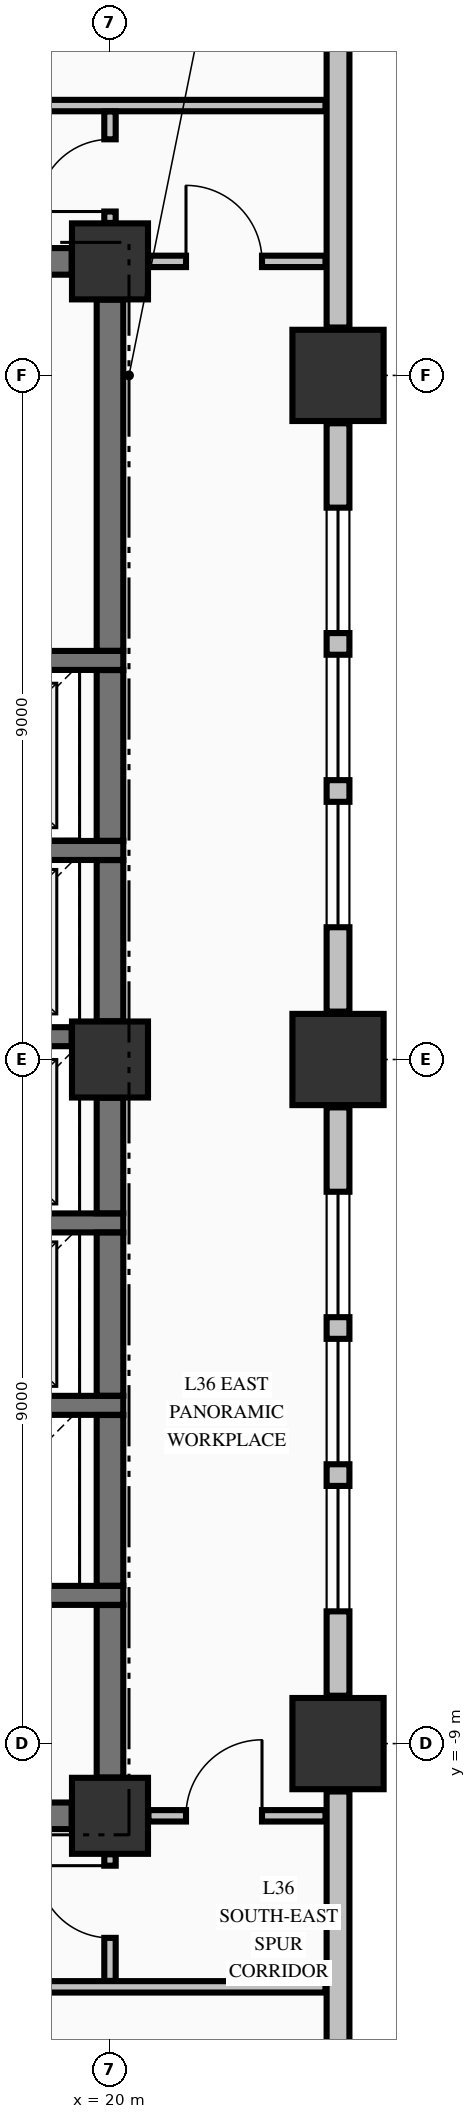
"""IFC4 building model, lengths in metres.
Left out: names, types, materials, properties, quantities, classifications, styles, units other than length and angle.
Written with IfcOpenShell. Run it as: python <this file> out.ifc"""

import sys

from ifc_helpers import new_model, si_unit, direction, frame, frame_2d, origin, origin_2d, place, context, subcontext, project, spatial, rectangle, extrude, element, fill, save


model = new_model("IFC4")
c1 = context("Model", 3, precision=1e-05, world=origin(), true_north=direction((0.0, 1.0)))
c2 = subcontext(c1, "Body", "Model", "MODEL_VIEW")
j1 = project(units=[si_unit("LENGTHUNIT", "METRE"), si_unit("PLANEANGLEUNIT", "RADIAN")], contexts=[c1])
p1 = place(None, origin())
s1 = spatial("IfcSite", under=j1, at=p1, CompositionType="ELEMENT")
p2 = place(p1, origin())
s2 = spatial("IfcBuilding", under=s1, at=p2, CompositionType="ELEMENT")
p3 = place(p2, frame((0.0, 0.0, 142.77)))
s3 = spatial("IfcBuildingStorey", under=s2, at=p3, CompositionType="ELEMENT", Elevation=142.77)
for number, where, z_axis, x_axis in (
    (1, (23.0, -9.0, -0.325), (0.0, 0.0, 1.0), (1.0, 0.0, 0.0)),
    (2, (23.0, 0.0, -0.325), (0.0, 0.0, 1.0), (1.0, 0.0, 0.0)),
    (3, (23.0, 9.0, -0.325), (0.0, 0.0, 1.0), (1.0, 0.0, 0.0)),
):
    element("IfcColumn", number, at=place(p3, frame(where, z_axis=z_axis, x_axis=x_axis)), inside=s3, PredefinedType="COLUMN", context=c2, shape_type="SweptSolid", body=[
        extrude(rectangle(XDim=1.2, YDim=1.2, at=origin_2d()), origin(), (0.0, 0.0, 1.0), 3.645),
    ])
for number, where, z_axis, x_axis in (
    (4, (20.0, -9.95, -0.325), (0.0, 0.0, 1.0), (1.0, 0.0, 0.0)),
    (5, (20.0, 10.5, -0.325), (0.0, 0.0, 1.0), (1.0, 0.0, 0.0)),
    (6, (20.0, 0.0, -0.325), (0.0, 0.0, 1.0), (1.0, 0.0, 0.0)),
):
    element("IfcColumn", number, at=place(p3, frame(where, z_axis=z_axis, x_axis=x_axis)), inside=s3, PredefinedType="COLUMN", context=c2, shape_type="SweptSolid", body=[
        extrude(rectangle(XDim=1.0, YDim=1.0, at=origin_2d()), origin(), (0.0, 0.0, 1.0), 3.645),
    ])
p4 = place(p3, frame((23.0, -20.37, 0.0), z_axis=(0.0, 0.0, 1.0), x_axis=(0.0, 1.0, 0.0)))
e7 = element("IfcWall", 7, at=p4, inside=s3, PredefinedType="STANDARD", context=c2, shape_type="SweptSolid", body=[
    extrude(rectangle(XDim=10.74, YDim=0.3, at=frame_2d((5.37, 0.0))), origin(), (0.0, 0.0, 1.0), 2.712),
])
p5 = place(p3, frame((23.0, -8.37, 0.0), z_axis=(0.0, 0.0, 1.0), x_axis=(0.0, 1.0, 0.0)))
e8 = element("IfcWall", 8, at=p5, inside=s3, PredefinedType="STANDARD", context=c2, shape_type="SweptSolid", body=[
    extrude(rectangle(XDim=7.74, YDim=0.3, at=frame_2d((3.87, 0.0))), origin(), (0.0, 0.0, 1.0), 2.712),
])
p6 = place(p5, frame((1.11, 0.0, 0.8)))
e9 = element("IfcOpeningElement", 9, at=p6, cuts=e8, PredefinedType="OPENING", context=c2, shape_type="SweptSolid", body=[
    extrude(rectangle(XDim=1.65, YDim=1.7, at=frame_2d((0.825, 0.85))), frame((0.0, 0.16, 0.0), z_axis=(0.0, -1.0, 0.0), x_axis=(1.0, 0.0, 0.0)), (0.0, 0.0, 1.0), 0.32),
])
p7 = place(p5, frame((3.045, 0.0, 0.8)))
e10 = element("IfcOpeningElement", 10, at=p7, cuts=e8, PredefinedType="OPENING", context=c2, shape_type="SweptSolid", body=[
    extrude(rectangle(XDim=1.65, YDim=1.7, at=frame_2d((0.825, 0.85))), frame((0.0, 0.16, 0.0), z_axis=(0.0, -1.0, 0.0), x_axis=(1.0, 0.0, 0.0)), (0.0, 0.0, 1.0), 0.32),
])
p8 = place(p5, frame((4.98, 0.0, 0.8)))
e11 = element("IfcOpeningElement", 11, at=p8, cuts=e8, PredefinedType="OPENING", context=c2, shape_type="SweptSolid", body=[
    extrude(rectangle(XDim=1.65, YDim=1.7, at=frame_2d((0.825, 0.85))), frame((0.0, 0.16, 0.0), z_axis=(0.0, -1.0, 0.0), x_axis=(1.0, 0.0, 0.0)), (0.0, 0.0, 1.0), 0.32),
])
p9 = place(p3, frame((23.0, 0.63, 0.0), z_axis=(0.0, 0.0, 1.0), x_axis=(0.0, 1.0, 0.0)))
e12 = element("IfcWall", 12, at=p9, inside=s3, PredefinedType="STANDARD", context=c2, shape_type="SweptSolid", body=[
    extrude(rectangle(XDim=7.74, YDim=0.3, at=frame_2d((3.87, 0.0))), origin(), (0.0, 0.0, 1.0), 2.712),
])
p10 = place(p9, frame((1.11, 0.0, 0.8)))
e13 = element("IfcOpeningElement", 13, at=p10, cuts=e12, PredefinedType="OPENING", context=c2, shape_type="SweptSolid", body=[
    extrude(rectangle(XDim=1.65, YDim=1.7, at=frame_2d((0.825, 0.85))), frame((0.0, 0.16, 0.0), z_axis=(0.0, -1.0, 0.0), x_axis=(1.0, 0.0, 0.0)), (0.0, 0.0, 1.0), 0.32),
])
p11 = place(p9, frame((3.045, 0.0, 0.8)))
e14 = element("IfcOpeningElement", 14, at=p11, cuts=e12, PredefinedType="OPENING", context=c2, shape_type="SweptSolid", body=[
    extrude(rectangle(XDim=1.65, YDim=1.7, at=frame_2d((0.825, 0.85))), frame((0.0, 0.16, 0.0), z_axis=(0.0, -1.0, 0.0), x_axis=(1.0, 0.0, 0.0)), (0.0, 0.0, 1.0), 0.32),
])
p12 = place(p9, frame((4.98, 0.0, 0.8)))
e15 = element("IfcOpeningElement", 15, at=p12, cuts=e12, PredefinedType="OPENING", context=c2, shape_type="SweptSolid", body=[
    extrude(rectangle(XDim=1.65, YDim=1.7, at=frame_2d((0.825, 0.85))), frame((0.0, 0.16, 0.0), z_axis=(0.0, -1.0, 0.0), x_axis=(1.0, 0.0, 0.0)), (0.0, 0.0, 1.0), 0.32),
])
p13 = place(p3, frame((23.0, 9.63, 0.0), z_axis=(0.0, 0.0, 1.0), x_axis=(0.0, 1.0, 0.0)))
e16 = element("IfcWall", 16, at=p13, inside=s3, PredefinedType="STANDARD", context=c2, shape_type="SweptSolid", body=[
    extrude(rectangle(XDim=10.74, YDim=0.3, at=frame_2d((5.37, 0.0))), origin(), (0.0, 0.0, 1.0), 2.712),
])
p14 = place(p3, frame((14.7, -9.95, 0.0), z_axis=(0.0, 0.0, 1.0), x_axis=(1.0, 0.0, 0.0)))
e17 = element("IfcWall", 17, at=p14, inside=s3, PredefinedType="SHEAR", context=c2, shape_type="SweptSolid", body=[
    extrude(rectangle(XDim=4.796, YDim=0.35, at=frame_2d((2.398, 0.0))), origin(), (0.0, 0.0, 1.0), 3.32),
])
p15 = place(p14, frame((0.65, 0.0, 0.0)))
e18 = element("IfcOpeningElement", 18, at=p15, cuts=e17, PredefinedType="OPENING", context=c2, shape_type="SweptSolid", body=[
    extrude(rectangle(XDim=1.2, YDim=2.15, at=frame_2d((0.6, 1.075))), frame((0.0, 0.185, 0.0), z_axis=(0.0, -1.0, 0.0), x_axis=(1.0, 0.0, 0.0)), (0.0, 0.0, 1.0), 0.37),
])
for number, where, z_axis, x_axis in (
    (19, (17.025, -7.05, 0.0), (0.0, 0.0, 1.0), (1.0, 0.0, 0.0)),
    (20, (17.025, -4.55, 0.0), (0.0, 0.0, 1.0), (1.0, 0.0, 0.0)),
    (21, (17.025, -2.15, 0.0), (0.0, 0.0, 1.0), (1.0, 0.0, 0.0)),
):
    element("IfcWall", number, at=place(p3, frame(where, z_axis=z_axis, x_axis=x_axis)), inside=s3, PredefinedType="SOLIDWALL", context=c2, shape_type="SweptSolid", body=[
        extrude(rectangle(XDim=3.15, YDim=0.25, at=frame_2d((1.575, 0.0))), origin(), (0.0, 0.0, 1.0), 3.32),
    ])
p16 = place(p3, frame((17.025, 0.3, 0.0), z_axis=(0.0, 0.0, 1.0), x_axis=(1.0, 0.0, 0.0)))
e22 = element("IfcWall", 22, at=p16, inside=s3, PredefinedType="SOLIDWALL", context=c2, shape_type="SweptSolid", body=[
    extrude(rectangle(XDim=2.471, YDim=0.25, at=frame_2d((1.236, 0.0))), origin(), (0.0, 0.0, 1.0), 3.32),
])
for number, where, z_axis, x_axis in (
    (23, (17.025, 2.75, 0.0), (0.0, 0.0, 1.0), (1.0, 0.0, 0.0)),
    (24, (17.025, 5.25, 0.0), (0.0, 0.0, 1.0), (1.0, 0.0, 0.0)),
):
    element("IfcWall", number, at=place(p3, frame(where, z_axis=z_axis, x_axis=x_axis)), inside=s3, PredefinedType="SOLIDWALL", context=c2, shape_type="SweptSolid", body=[
        extrude(rectangle(XDim=3.15, YDim=0.25, at=frame_2d((1.575, 0.0))), origin(), (0.0, 0.0, 1.0), 3.32),
    ])
p17 = place(p3, frame((14.7, 10.5, 0.0), z_axis=(0.0, 0.0, 1.0), x_axis=(1.0, 0.0, 0.0)))
e25 = element("IfcWall", 25, at=p17, inside=s3, PredefinedType="SHEAR", context=c2, shape_type="SweptSolid", body=[
    extrude(rectangle(XDim=4.796, YDim=0.35, at=frame_2d((2.398, 0.0))), origin(), (0.0, 0.0, 1.0), 3.32),
])
p18 = place(p17, frame((0.65, 0.0, 0.0)))
e26 = element("IfcOpeningElement", 26, at=p18, cuts=e25, PredefinedType="OPENING", context=c2, shape_type="SweptSolid", body=[
    extrude(rectangle(XDim=1.2, YDim=2.15, at=frame_2d((0.6, 1.075))), frame((0.0, 0.185, 0.0), z_axis=(0.0, -1.0, 0.0), x_axis=(1.0, 0.0, 0.0)), (0.0, 0.0, 1.0), 0.37),
])
p19 = place(p17, frame((3.25, 0.0, 0.0)))
e27 = element("IfcOpeningElement", 27, at=p19, cuts=e25, PredefinedType="OPENING", context=c2, shape_type="SweptSolid", body=[
    extrude(rectangle(XDim=0.9, YDim=2.15, at=frame_2d((0.45, 1.075))), frame((0.0, 0.185, 0.0), z_axis=(0.0, -1.0, 0.0), x_axis=(1.0, 0.0, 0.0)), (0.0, 0.0, 1.0), 0.37),
])
p20 = place(p3, frame((-27.835, -12.2, 0.0), z_axis=(0.0, 0.0, 1.0), x_axis=(1.0, 0.0, 0.0)))
e28 = element("IfcWall", 28, at=p20, inside=s3, PredefinedType="PARTITIONING", context=c2, shape_type="SweptSolid", body=[
    extrude(rectangle(XDim=50.67, YDim=0.15, at=frame_2d((25.335, 0.0))), origin(), (0.0, 0.0, 1.0), 3.32),
])
p21 = place(p20, frame((13.985, 0.0, 0.0)))
e29 = element("IfcOpeningElement", 29, at=p21, cuts=e28, PredefinedType="OPENING", context=c2, shape_type="SweptSolid", body=[
    extrude(rectangle(XDim=1.1, YDim=2.15, at=frame_2d((0.55, 1.075))), frame((0.0, 0.085, 0.0), z_axis=(0.0, -1.0, 0.0), x_axis=(1.0, 0.0, 0.0)), (0.0, 0.0, 1.0), 0.17),
])
p22 = place(p20, frame((23.885, 0.0, 0.0)))
e30 = element("IfcOpeningElement", 30, at=p22, cuts=e28, PredefinedType="OPENING", context=c2, shape_type="SweptSolid", body=[
    extrude(rectangle(XDim=1.1, YDim=2.15, at=frame_2d((0.55, 1.075))), frame((0.0, 0.085, 0.0), z_axis=(0.0, -1.0, 0.0), x_axis=(1.0, 0.0, 0.0)), (0.0, 0.0, 1.0), 0.17),
])
p23 = place(p20, frame((30.685, 0.0, 0.0)))
e31 = element("IfcOpeningElement", 31, at=p23, cuts=e28, PredefinedType="OPENING", context=c2, shape_type="SweptSolid", body=[
    extrude(rectangle(XDim=1.1, YDim=2.15, at=frame_2d((0.55, 1.075))), frame((0.0, 0.085, 0.0), z_axis=(0.0, -1.0, 0.0), x_axis=(1.0, 0.0, 0.0)), (0.0, 0.0, 1.0), 0.17),
])
p24 = place(p20, frame((39.935, 0.0, 0.0)))
e32 = element("IfcOpeningElement", 32, at=p24, cuts=e28, PredefinedType="OPENING", context=c2, shape_type="SweptSolid", body=[
    extrude(rectangle(XDim=1.1, YDim=2.15, at=frame_2d((0.55, 1.075))), frame((0.0, 0.085, 0.0), z_axis=(0.0, -1.0, 0.0), x_axis=(1.0, 0.0, 0.0)), (0.0, 0.0, 1.0), 0.17),
])
p25 = place(p3, frame((20.506, -9.95, 0.0), z_axis=(0.0, 0.0, 1.0), x_axis=(1.0, 0.0, 0.0)))
e33 = element("IfcWall", 33, at=p25, inside=s3, PredefinedType="PARTITIONING", context=c2, shape_type="SweptSolid", body=[
    extrude(rectangle(XDim=2.329, YDim=0.15, at=frame_2d((1.165, 0.0))), origin(), (0.0, 0.0, 1.0), 3.32),
])
p26 = place(p25, frame((0.494, 0.0, 0.0)))
e34 = element("IfcOpeningElement", 34, at=p26, cuts=e33, PredefinedType="OPENING", context=c2, shape_type="SweptSolid", body=[
    extrude(rectangle(XDim=1.0, YDim=2.15, at=frame_2d((0.5, 1.075))), frame((0.0, 0.085, 0.0), z_axis=(0.0, -1.0, 0.0), x_axis=(1.0, 0.0, 0.0)), (0.0, 0.0, 1.0), 0.17),
])
p27 = place(p3, frame((20.506, 10.5, 0.0), z_axis=(0.0, 0.0, 1.0), x_axis=(1.0, 0.0, 0.0)))
e35 = element("IfcWall", 35, at=p27, inside=s3, PredefinedType="PARTITIONING", context=c2, shape_type="SweptSolid", body=[
    extrude(rectangle(XDim=2.329, YDim=0.15, at=frame_2d((1.165, 0.0))), origin(), (0.0, 0.0, 1.0), 3.32),
])
p28 = place(p27, frame((0.494, 0.0, 0.0)))
e36 = element("IfcOpeningElement", 36, at=p28, cuts=e35, PredefinedType="OPENING", context=c2, shape_type="SweptSolid", body=[
    extrude(rectangle(XDim=1.0, YDim=2.15, at=frame_2d((0.5, 1.075))), frame((0.0, 0.085, 0.0), z_axis=(0.0, -1.0, 0.0), x_axis=(1.0, 0.0, 0.0)), (0.0, 0.0, 1.0), 0.17),
])
p29 = place(p3, frame((-27.835, 12.55, 0.0), z_axis=(0.0, 0.0, 1.0), x_axis=(1.0, 0.0, 0.0)))
e37 = element("IfcWall", 37, at=p29, inside=s3, PredefinedType="PARTITIONING", context=c2, shape_type="SweptSolid", body=[
    extrude(rectangle(XDim=50.67, YDim=0.15, at=frame_2d((25.335, 0.0))), origin(), (0.0, 0.0, 1.0), 3.32),
])
p30 = place(p29, frame((13.81, 0.0, 0.0)))
e38 = element("IfcOpeningElement", 38, at=p30, cuts=e37, PredefinedType="OPENING", context=c2, shape_type="SweptSolid", body=[
    extrude(rectangle(XDim=1.05, YDim=2.15, at=frame_2d((0.525, 1.075))), frame((0.0, 0.085, 0.0), z_axis=(0.0, -1.0, 0.0), x_axis=(1.0, 0.0, 0.0)), (0.0, 0.0, 1.0), 0.17),
])
p31 = place(p29, frame((25.11, 0.0, 0.0)))
e39 = element("IfcOpeningElement", 39, at=p31, cuts=e37, PredefinedType="OPENING", context=c2, shape_type="SweptSolid", body=[
    extrude(rectangle(XDim=1.05, YDim=2.15, at=frame_2d((0.525, 1.075))), frame((0.0, 0.085, 0.0), z_axis=(0.0, -1.0, 0.0), x_axis=(1.0, 0.0, 0.0)), (0.0, 0.0, 1.0), 0.17),
])
p32 = place(p29, frame((44.16, 0.0, 0.0)))
e40 = element("IfcOpeningElement", 40, at=p32, cuts=e37, PredefinedType="OPENING", context=c2, shape_type="SweptSolid", body=[
    extrude(rectangle(XDim=1.05, YDim=2.15, at=frame_2d((0.525, 1.075))), frame((0.0, 0.085, 0.0), z_axis=(0.0, -1.0, 0.0), x_axis=(1.0, 0.0, 0.0)), (0.0, 0.0, 1.0), 0.17),
])
p33 = place(p3, frame((20.0, -9.446, 0.0), z_axis=(0.0, 0.0, 1.0), x_axis=(0.0, 1.0, 0.0)))
e41 = element("IfcWall", 41, at=p33, inside=s3, PredefinedType="SHEAR", context=c2, shape_type="SweptSolid", body=[
    extrude(rectangle(XDim=2.269, YDim=0.35, at=frame_2d((1.135, 0.0))), origin(), (0.0, 0.0, 1.0), 3.32),
])
p34 = place(p3, frame((20.0, -6.923, 0.0), z_axis=(0.0, 0.0, 1.0), x_axis=(0.0, 1.0, 0.0)))
e42 = element("IfcWall", 42, at=p34, inside=s3, PredefinedType="SHEAR", context=c2, shape_type="SweptSolid", body=[
    extrude(rectangle(XDim=2.246, YDim=0.35, at=frame_2d((1.123, 0.0))), origin(), (0.0, 0.0, 1.0), 3.32),
])
p35 = place(p3, frame((20.0, -4.423, 0.0), z_axis=(0.0, 0.0, 1.0), x_axis=(0.0, 1.0, 0.0)))
e43 = element("IfcWall", 43, at=p35, inside=s3, PredefinedType="SHEAR", context=c2, shape_type="SweptSolid", body=[
    extrude(rectangle(XDim=2.146, YDim=0.35, at=frame_2d((1.073, 0.0))), origin(), (0.0, 0.0, 1.0), 3.32),
])
p36 = place(p3, frame((20.0, -2.023, 0.0), z_axis=(0.0, 0.0, 1.0), x_axis=(0.0, 1.0, 0.0)))
e44 = element("IfcWall", 44, at=p36, inside=s3, PredefinedType="SHEAR", context=c2, shape_type="SweptSolid", body=[
    extrude(rectangle(XDim=1.519, YDim=0.35, at=frame_2d((0.76, 0.0))), origin(), (0.0, 0.0, 1.0), 3.32),
])
p37 = place(p3, frame((20.0, 0.504, 0.0), z_axis=(0.0, 0.0, 1.0), x_axis=(0.0, 1.0, 0.0)))
e45 = element("IfcWall", 45, at=p37, inside=s3, PredefinedType="SHEAR", context=c2, shape_type="SweptSolid", body=[
    extrude(rectangle(XDim=2.119, YDim=0.35, at=frame_2d((1.06, 0.0))), origin(), (0.0, 0.0, 1.0), 3.32),
])
p38 = place(p3, frame((20.0, 2.877, 0.0), z_axis=(0.0, 0.0, 1.0), x_axis=(0.0, 1.0, 0.0)))
e46 = element("IfcWall", 46, at=p38, inside=s3, PredefinedType="SHEAR", context=c2, shape_type="SweptSolid", body=[
    extrude(rectangle(XDim=2.246, YDim=0.35, at=frame_2d((1.123, 0.0))), origin(), (0.0, 0.0, 1.0), 3.32),
])
p39 = place(p3, frame((20.0, 5.377, 0.0), z_axis=(0.0, 0.0, 1.0), x_axis=(0.0, 1.0, 0.0)))
e47 = element("IfcWall", 47, at=p39, inside=s3, PredefinedType="SHEAR", context=c2, shape_type="SweptSolid", body=[
    extrude(rectangle(XDim=4.619, YDim=0.35, at=frame_2d((2.31, 0.0))), origin(), (0.0, 0.0, 1.0), 3.32),
])
p40 = place(p3, frame((20.0, -12.122, 0.0), z_axis=(0.0, 0.0, 1.0), x_axis=(0.0, 1.0, 0.0)))
e48 = element("IfcWall", 48, at=p40, inside=s3, PredefinedType="PARTITIONING", context=c2, shape_type="SweptSolid", body=[
    extrude(rectangle(XDim=1.666, YDim=0.15, at=frame_2d((0.833, 0.0))), origin(), (0.0, 0.0, 1.0), 2.81),
])
p41 = place(p40, frame((0.566, 0.0, 0.0)))
e49 = element("IfcOpeningElement", 49, at=p41, cuts=e48, PredefinedType="OPENING", context=c2, shape_type="SweptSolid", body=[
    extrude(rectangle(XDim=0.95, YDim=2.15, at=frame_2d((0.475, 1.075))), frame((0.0, 0.085, 0.0), z_axis=(0.0, -1.0, 0.0), x_axis=(1.0, 0.0, 0.0)), (0.0, 0.0, 1.0), 0.17),
])
p42 = place(p3, frame((20.0, 11.006, 0.0), z_axis=(0.0, 0.0, 1.0), x_axis=(0.0, 1.0, 0.0)))
e50 = element("IfcWall", 50, at=p42, inside=s3, PredefinedType="PARTITIONING", context=c2, shape_type="SweptSolid", body=[
    extrude(rectangle(XDim=1.466, YDim=0.15, at=frame_2d((0.733, 0.0))), origin(), (0.0, 0.0, 1.0), 2.81),
])
p43 = place(p42, frame((0.15, 0.0, 0.0)))
e51 = element("IfcOpeningElement", 51, at=p43, cuts=e50, PredefinedType="OPENING", context=c2, shape_type="SweptSolid", body=[
    extrude(rectangle(XDim=0.95, YDim=2.15, at=frame_2d((0.475, 1.075))), frame((0.0, 0.085, 0.0), z_axis=(0.0, -1.0, 0.0), x_axis=(1.0, 0.0, 0.0)), (0.0, 0.0, 1.0), 0.17),
])
p44 = place(p6, origin())
e52 = element("IfcWindow", 52, at=p44, inside=s3, PartitioningType="SINGLE_PANEL", PredefinedType="WINDOW", context=c2, shape_type="SweptSolid", body=[
    extrude(rectangle(XDim=1.65, YDim=1.7, at=frame_2d((0.825, 0.85))), frame((0.0, 0.03, 0.0), z_axis=(0.0, -1.0, 0.0), x_axis=(1.0, 0.0, 0.0)), (0.0, 0.0, 1.0), 0.06),
])
fill(e9, e52)
p45 = place(p7, origin())
e53 = element("IfcWindow", 53, at=p45, inside=s3, PartitioningType="SINGLE_PANEL", PredefinedType="WINDOW", context=c2, shape_type="SweptSolid", body=[
    extrude(rectangle(XDim=1.65, YDim=1.7, at=frame_2d((0.825, 0.85))), frame((0.0, 0.03, 0.0), z_axis=(0.0, -1.0, 0.0), x_axis=(1.0, 0.0, 0.0)), (0.0, 0.0, 1.0), 0.06),
])
fill(e10, e53)
p46 = place(p8, origin())
e54 = element("IfcWindow", 54, at=p46, inside=s3, PartitioningType="SINGLE_PANEL", PredefinedType="WINDOW", context=c2, shape_type="SweptSolid", body=[
    extrude(rectangle(XDim=1.65, YDim=1.7, at=frame_2d((0.825, 0.85))), frame((0.0, 0.03, 0.0), z_axis=(0.0, -1.0, 0.0), x_axis=(1.0, 0.0, 0.0)), (0.0, 0.0, 1.0), 0.06),
])
fill(e11, e54)
p47 = place(p10, origin())
e55 = element("IfcWindow", 55, at=p47, inside=s3, PartitioningType="SINGLE_PANEL", PredefinedType="WINDOW", context=c2, shape_type="SweptSolid", body=[
    extrude(rectangle(XDim=1.65, YDim=1.7, at=frame_2d((0.825, 0.85))), frame((0.0, 0.03, 0.0), z_axis=(0.0, -1.0, 0.0), x_axis=(1.0, 0.0, 0.0)), (0.0, 0.0, 1.0), 0.06),
])
fill(e13, e55)
p48 = place(p11, origin())
e56 = element("IfcWindow", 56, at=p48, inside=s3, PartitioningType="SINGLE_PANEL", PredefinedType="WINDOW", context=c2, shape_type="SweptSolid", body=[
    extrude(rectangle(XDim=1.65, YDim=1.7, at=frame_2d((0.825, 0.85))), frame((0.0, 0.03, 0.0), z_axis=(0.0, -1.0, 0.0), x_axis=(1.0, 0.0, 0.0)), (0.0, 0.0, 1.0), 0.06),
])
fill(e14, e56)
p49 = place(p12, origin())
e57 = element("IfcWindow", 57, at=p49, inside=s3, PartitioningType="SINGLE_PANEL", PredefinedType="WINDOW", context=c2, shape_type="SweptSolid", body=[
    extrude(rectangle(XDim=1.65, YDim=1.7, at=frame_2d((0.825, 0.85))), frame((0.0, 0.03, 0.0), z_axis=(0.0, -1.0, 0.0), x_axis=(1.0, 0.0, 0.0)), (0.0, 0.0, 1.0), 0.06),
])
fill(e15, e57)
p50 = place(p43, origin())
e58 = element("IfcDoor", 58, at=p50, inside=s3, OperationType="SINGLE_SWING_LEFT", PredefinedType="DOOR", context=c2, shape_type="SweptSolid", body=[
    extrude(rectangle(XDim=0.95, YDim=2.15, at=frame_2d((0.475, 1.075))), frame((0.0, 0.025, 0.0), z_axis=(0.0, -1.0, 0.0), x_axis=(1.0, 0.0, 0.0)), (0.0, 0.0, 1.0), 0.05),
])
fill(e51, e58)
p51 = place(p41, origin())
e59 = element("IfcDoor", 59, at=p51, inside=s3, OperationType="SINGLE_SWING_RIGHT", PredefinedType="DOOR", context=c2, shape_type="SweptSolid", body=[
    extrude(rectangle(XDim=0.95, YDim=2.15, at=frame_2d((0.475, 1.075))), frame((0.0, 0.025, 0.0), z_axis=(0.0, -1.0, 0.0), x_axis=(1.0, 0.0, 0.0)), (0.0, 0.0, 1.0), 0.05),
])
fill(e49, e59)
p52 = place(p28, origin())
e60 = element("IfcDoor", 60, at=p52, inside=s3, OperationType="SINGLE_SWING_LEFT", PredefinedType="DOOR", context=c2, shape_type="SweptSolid", body=[
    extrude(rectangle(XDim=1.0, YDim=2.15, at=frame_2d((0.5, 1.075))), frame((0.0, 0.025, 0.0), z_axis=(0.0, -1.0, 0.0), x_axis=(1.0, 0.0, 0.0)), (0.0, 0.0, 1.0), 0.05),
])
fill(e36, e60)
p53 = place(p26, origin())
e61 = element("IfcDoor", 61, at=p53, inside=s3, OperationType="SINGLE_SWING_RIGHT", PredefinedType="DOOR", context=c2, shape_type="SweptSolid", body=[
    extrude(rectangle(XDim=1.0, YDim=2.15, at=frame_2d((0.5, 1.075))), frame((0.0, 0.025, 0.0), z_axis=(0.0, -1.0, 0.0), x_axis=(1.0, 0.0, 0.0)), (0.0, 0.0, 1.0), 0.05),
])
fill(e34, e61)
save(model, sys.argv[1])
